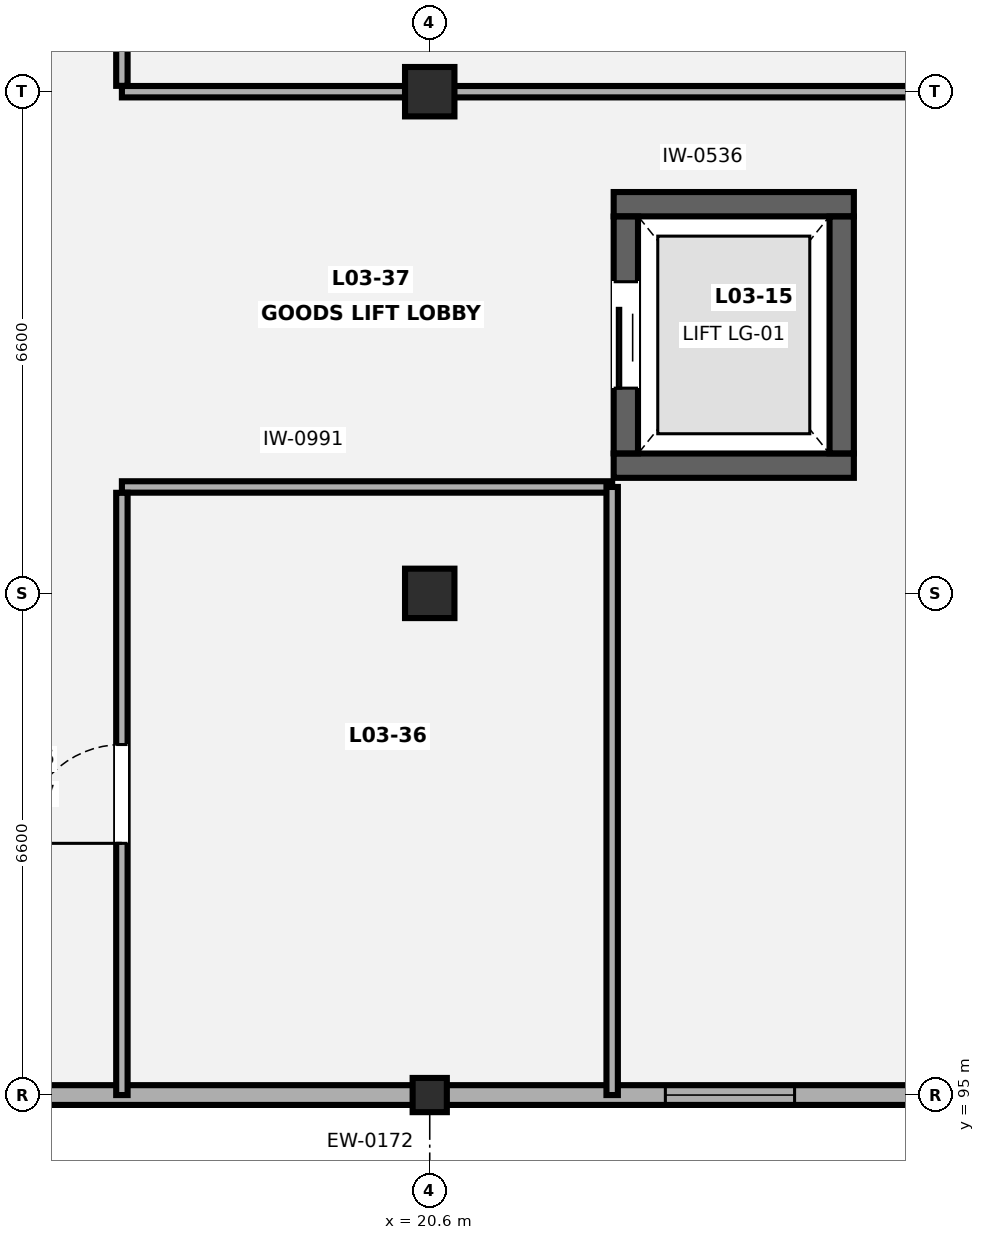
"""IFC4 building model, lengths in metres.
Left out: names, types, materials, properties, quantities, classifications, styles, units other than length and angle.
Written with IfcOpenShell. Run it as: python <this file> out.ifc"""

import sys

from ifc_helpers import new_model, si_unit, direction, frame, frame_2d, origin, origin_2d, place, context, subcontext, project, spatial, rectangle, extrude, element, fill, save


model = new_model("IFC4")
c1 = context("Model", 3, precision=1e-05, world=origin(), true_north=direction((0.0, 1.0)))
c2 = subcontext(c1, "Body", "Model", "MODEL_VIEW")
j1 = project(units=[si_unit("LENGTHUNIT", "METRE"), si_unit("PLANEANGLEUNIT", "RADIAN")], contexts=[c1])
p1 = place(None, origin())
s1 = spatial("IfcSite", under=j1, at=p1, CompositionType="ELEMENT")
p2 = place(p1, origin())
s2 = spatial("IfcBuilding", under=s1, at=p2, CompositionType="ELEMENT")
p3 = place(p2, frame((0.0, 0.0, 13.3)))
s3 = spatial("IfcBuildingStorey", under=s2, at=p3, CompositionType="ELEMENT", Elevation=13.3)
p4 = place(p3, frame((20.6, 95.0, 0.0), z_axis=(0.0, 0.0, 1.0), x_axis=(1.0, 0.0, 0.0)))
e1 = element("IfcColumn", 1, at=p4, inside=s3, PredefinedType="PILASTER", context=c2, shape_type="SweptSolid", body=[
    extrude(rectangle(XDim=0.45, YDim=0.45, at=origin_2d()), origin(), (0.0, 0.0, 1.0), 4.2),
])
for number, where, z_axis, x_axis in (
    (2, (20.6, 101.6, 0.0), (0.0, 0.0, 1.0), (1.0, 0.0, 0.0)),
    (3, (20.6, 108.2, 0.0), (0.0, 0.0, 1.0), (1.0, 0.0, 0.0)),
):
    element("IfcColumn", number, at=place(p3, frame(where, z_axis=z_axis, x_axis=x_axis)), inside=s3, PredefinedType="COLUMN", context=c2, shape_type="SweptSolid", body=[
        extrude(rectangle(XDim=0.65, YDim=0.65, at=origin_2d()), origin(), (0.0, 0.0, 1.0), 4.2),
    ])
p5 = place(p3, frame((26.977, 95.0, 0.0), z_axis=(0.0, 0.0, 1.0), x_axis=(-1.0, 0.0, 0.0)))
e4 = element("IfcWall", 4, at=p5, inside=s3, PredefinedType="SOLIDWALL", context=c2, shape_type="SweptSolid", body=[
    extrude(rectangle(XDim=19.354, YDim=0.26, at=frame_2d((9.677, 0.0))), origin(), (0.0, 0.0, 1.0), 2.48),
])
p6 = place(p5, frame((1.577, 0.0, 0.85)))
e5 = element("IfcOpeningElement", 5, at=p6, cuts=e4, PredefinedType="OPENING", context=c2, shape_type="SweptSolid", body=[
    extrude(rectangle(XDim=1.7, YDim=1.4, at=frame_2d((0.85, 0.7))), frame((0.0, 0.14, 0.0), z_axis=(0.0, -1.0, 0.0), x_axis=(1.0, 0.0, 0.0)), (0.0, 0.0, 1.0), 0.28),
])
for number, where, z_axis, x_axis in (
    (6, (23.02, 103.28, 0.0), (0.0, 0.0, 1.0), (1.0, 0.0, 0.0)),
    (7, (23.02, 106.72, 0.0), (0.0, 0.0, 1.0), (1.0, 0.0, 0.0)),
):
    element("IfcWall", number, at=place(p3, frame(where, z_axis=z_axis, x_axis=x_axis)), inside=s3, PredefinedType="SHEAR", context=c2, shape_type="SweptSolid", body=[
        extrude(rectangle(XDim=3.16, YDim=0.32, at=frame_2d((1.58, 0.0))), origin(), (0.0, 0.0, 1.0), 3.85),
    ])
p7 = place(p3, frame((23.18, 103.442, 0.0), z_axis=(0.0, 0.0, 1.0), x_axis=(0.0, 1.0, 0.0)))
e8 = element("IfcWall", 8, at=p7, inside=s3, PredefinedType="SHEAR", context=c2, shape_type="SweptSolid", body=[
    extrude(rectangle(XDim=3.116, YDim=0.32, at=frame_2d((1.558, 0.0))), origin(), (0.0, 0.0, 1.0), 3.85),
])
p8 = place(p7, frame((0.858, 0.0, 0.0)))
e9 = element("IfcOpeningElement", 9, at=p8, cuts=e8, PredefinedType="OPENING", context=c2, shape_type="SweptSolid", body=[
    extrude(rectangle(XDim=1.4, YDim=2.25, at=frame_2d((0.7, 1.125))), frame((0.0, 0.17, 0.0), z_axis=(0.0, -1.0, 0.0), x_axis=(1.0, 0.0, 0.0)), (0.0, 0.0, 1.0), 0.34),
])
p9 = place(p3, frame((26.02, 103.442, 0.0), z_axis=(0.0, 0.0, 1.0), x_axis=(0.0, 1.0, 0.0)))
e10 = element("IfcWall", 10, at=p9, inside=s3, PredefinedType="SHEAR", context=c2, shape_type="SweptSolid", body=[
    extrude(rectangle(XDim=3.116, YDim=0.32, at=frame_2d((1.558, 0.0))), origin(), (0.0, 0.0, 1.0), 3.85),
])
p10 = place(p3, frame((16.55, 103.0, 0.0), z_axis=(0.0, 0.0, 1.0), x_axis=(1.0, 0.0, 0.0)))
e11 = element("IfcWall", 11, at=p10, inside=s3, PredefinedType="PARTITIONING", context=c2, shape_type="SweptSolid", body=[
    extrude(rectangle(XDim=6.45, YDim=0.15, at=frame_2d((3.225, 0.0))), origin(), (0.0, 0.0, 1.0), 3.85),
])
p11 = place(p3, frame((16.55, 95.0, 0.0), z_axis=(0.0, 0.0, 1.0), x_axis=(0.0, 1.0, 0.0)))
e12 = element("IfcWall", 12, at=p11, inside=s3, PredefinedType="PARTITIONING", context=c2, shape_type="SweptSolid", body=[
    extrude(rectangle(XDim=7.923, YDim=0.15, at=frame_2d((3.961, 0.0))), origin(), (0.0, 0.0, 1.0), 3.85),
])
p12 = place(p11, frame((3.312, 0.0, 0.0)))
e13 = element("IfcOpeningElement", 13, at=p12, cuts=e12, PredefinedType="OPENING", context=c2, shape_type="SweptSolid", body=[
    extrude(rectangle(XDim=1.3, YDim=2.2, at=frame_2d((0.65, 1.1))), frame((0.0, 0.085, 0.0), z_axis=(0.0, -1.0, 0.0), x_axis=(1.0, 0.0, 0.0)), (0.0, 0.0, 1.0), 0.17),
])
p13 = place(p3, frame((23.0, 95.0, 0.0), z_axis=(0.0, 0.0, 1.0), x_axis=(0.0, 1.0, 0.0)))
e14 = element("IfcWall", 14, at=p13, inside=s3, PredefinedType="PARTITIONING", context=c2, shape_type="SweptSolid", body=[
    extrude(rectangle(XDim=8.0, YDim=0.15, at=frame_2d((4.0, 0.0))), origin(), (0.0, 0.0, 1.0), 3.85),
])
p14 = place(p3, frame((16.55, 108.2, 0.0), z_axis=(0.0, 0.0, 1.0), x_axis=(1.0, 0.0, 0.0)))
e15 = element("IfcWall", 15, at=p14, inside=s3, PredefinedType="PARTITIONING", context=c2, shape_type="SweptSolid", body=[
    extrude(rectangle(XDim=10.538, YDim=0.15, at=frame_2d((5.269, 0.0))), origin(), (0.0, 0.0, 1.0), 2.435),
])
p15 = place(p3, frame((16.55, 108.277, 0.0), z_axis=(0.0, 0.0, 1.0), x_axis=(0.0, 1.0, 0.0)))
e16 = element("IfcWall", 16, at=p15, inside=s3, PredefinedType="PARTITIONING", context=c2, shape_type="SweptSolid", body=[
    extrude(rectangle(XDim=13.046, YDim=0.15, at=frame_2d((6.523, 0.0))), origin(), (0.0, 0.0, 1.0), 3.85),
])
p16 = place(p15, frame((5.873, 0.0, 0.0)))
e17 = element("IfcOpeningElement", 17, at=p16, cuts=e16, PredefinedType="OPENING", context=c2, shape_type="SweptSolid", body=[
    extrude(rectangle(XDim=1.3, YDim=2.2, at=frame_2d((0.65, 1.1))), frame((0.0, 0.085, 0.0), z_axis=(0.0, -1.0, 0.0), x_axis=(1.0, 0.0, 0.0)), (0.0, 0.0, 1.0), 0.17),
])
p17 = place(p6, origin())
e18 = element("IfcWindow", 18, at=p17, inside=s3, PartitioningType="SINGLE_PANEL", PredefinedType="WINDOW", context=c2, shape_type="SweptSolid", body=[
    extrude(rectangle(XDim=1.7, YDim=1.4, at=frame_2d((0.85, 0.7))), frame((0.0, 0.03, 0.0), z_axis=(0.0, -1.0, 0.0), x_axis=(1.0, 0.0, 0.0)), (0.0, 0.0, 1.0), 0.06),
])
fill(e5, e18)
p18 = place(p8, origin())
e19 = element("IfcDoor", 19, at=p18, inside=s3, OperationType="DOUBLE_DOOR_SLIDING", PredefinedType="DOOR", context=c2, shape_type="SweptSolid", body=[
    extrude(rectangle(XDim=1.4, YDim=2.25, at=frame_2d((0.7, 1.125))), frame((0.0, 0.025, 0.0), z_axis=(0.0, -1.0, 0.0), x_axis=(1.0, 0.0, 0.0)), (0.0, 0.0, 1.0), 0.05),
])
fill(e9, e19)
p19 = place(p12, origin())
e20 = element("IfcDoor", 20, at=p19, inside=s3, OperationType="SINGLE_SWING_LEFT", PredefinedType="DOOR", context=c2, shape_type="SweptSolid", body=[
    extrude(rectangle(XDim=1.3, YDim=2.2, at=frame_2d((0.65, 1.1))), frame((0.0, 0.025, 0.0), z_axis=(0.0, -1.0, 0.0), x_axis=(1.0, 0.0, 0.0)), (0.0, 0.0, 1.0), 0.05),
])
fill(e13, e20)
save(model, sys.argv[1])
